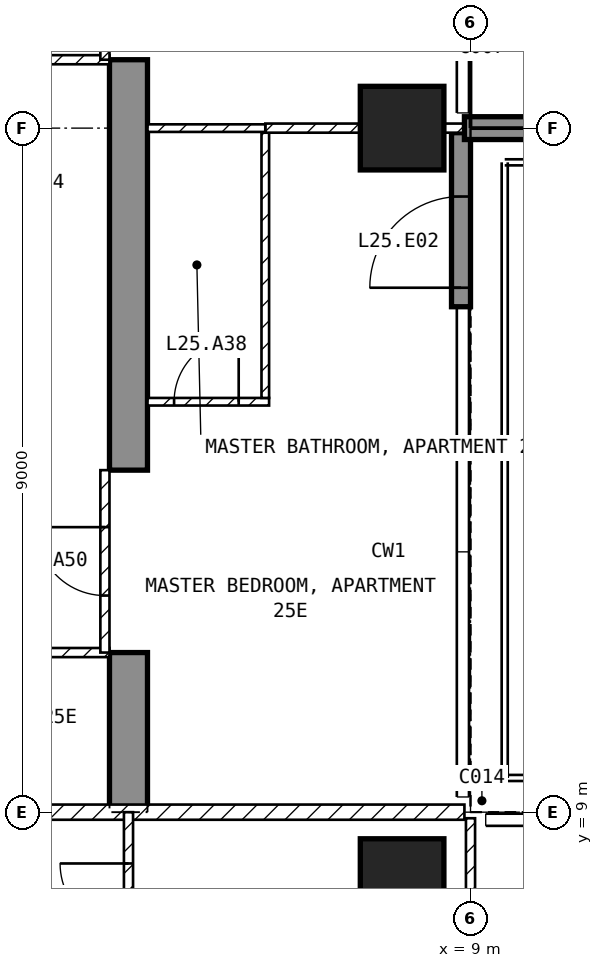
"""IFC4 building model, lengths in metres.
Left out: names, types, materials, properties, quantities, classifications, styles, units other than length and angle.
Written with IfcOpenShell. Run it as: python <this file> out.ifc"""

import sys

from ifc_helpers import new_model, si_unit, direction, frame, frame_2d, origin, origin_2d, place, context, subcontext, project, spatial, polyline, rectangle, outline, extrude, element, fill, save


model = new_model("IFC4")
c1 = context("Model", 3, precision=1e-05, world=origin(), true_north=direction((0.0, 1.0)))
c2 = subcontext(c1, "Body", "Model", "MODEL_VIEW")
j1 = project(units=[si_unit("LENGTHUNIT", "METRE"), si_unit("PLANEANGLEUNIT", "RADIAN")], contexts=[c1])
p1 = place(None, origin())
s1 = spatial("IfcSite", under=j1, at=p1, CompositionType="ELEMENT")
p2 = place(p1, origin())
s2 = spatial("IfcBuilding", under=s1, at=p2, CompositionType="ELEMENT")
p3 = place(p2, frame((0.0, 0.0, 109.4)))
s3 = spatial("IfcBuildingStorey", under=s2, at=p3, CompositionType="ELEMENT", Elevation=109.4)
for number, where, z_axis, x_axis in (
    (1, (8.1, 8.1, -0.25), (0.0, 0.0, 1.0), (1.0, 0.0, 0.0)),
    (2, (8.1, 18.0, -0.25), (0.0, 0.0, 1.0), (1.0, 0.0, 0.0)),
):
    element("IfcColumn", number, at=place(p3, frame(where, z_axis=z_axis, x_axis=x_axis)), inside=s3, PredefinedType="COLUMN", context=c2, shape_type="SweptSolid", body=[
        extrude(rectangle(XDim=1.1, YDim=1.1, at=origin_2d()), origin(), (0.0, 0.0, 1.0), 3.5),
    ])
p4 = place(p3, frame((4.25, 9.0, -0.25), z_axis=(1.0, 0.0, 0.0), x_axis=(0.0, 1.0, 0.0)))
e3 = element("IfcWall", 3, at=p4, inside=s3, PredefinedType="SHEAR", context=c2, shape_type="SweptSolid", body=[
    extrude(outline(polyline([(0.0, 0.0), (2.1, 0.0), (2.1, 2.65), (4.5, 2.65), (4.5, 0.0), (9.9, 0.0), (9.9, 2.65), (12.3, 2.65), (12.3, 0.0), (16.55, 0.0), (16.55, 3.5), (0.0, 3.5), (0.0, 0.0)])), origin(), (0.0, 0.0, 1.0), 0.5),
])
p5 = place(p3, frame((8.875, 15.65, 0.0), z_axis=(0.0, 0.0, 1.0), x_axis=(0.0, 1.0, 0.0)))
e4 = element("IfcWall", 4, at=p5, inside=s3, PredefinedType="SOLIDWALL", context=c2, shape_type="SweptSolid", body=[
    extrude(rectangle(XDim=2.29, YDim=0.25, at=frame_2d((1.145, 0.0))), origin(), (0.0, 0.0, 1.0), 3.25),
])
p6 = place(p5, frame((0.25, 0.0, 0.0)))
e5 = element("IfcOpeningElement", 5, at=p6, cuts=e4, PredefinedType="OPENING", context=c2, shape_type="SweptSolid", body=[
    extrude(rectangle(XDim=1.2, YDim=2.4, at=frame_2d((0.6, 1.2))), frame((0.0, 0.135, 0.0), z_axis=(0.0, -1.0, 0.0), x_axis=(1.0, 0.0, 0.0)), (0.0, 0.0, 1.0), 0.27),
])
p7 = place(p3, frame((8.92, 18.0, 0.0), z_axis=(0.0, 0.0, 1.0), x_axis=(1.0, 0.0, 0.0)))
e6 = element("IfcWall", 6, at=p7, inside=s3, PredefinedType="SOLIDWALL", context=c2, shape_type="SweptSolid", body=[
    extrude(rectangle(XDim=2.82, YDim=0.3, at=frame_2d((1.41, 0.0))), origin(), (0.0, 0.0, 1.0), 3.25),
])
p8 = place(p3, frame((-8.92, 9.0, 0.0), z_axis=(0.0, 0.0, 1.0), x_axis=(1.0, 0.0, 0.0)))
e7 = element("IfcWall", 7, at=p8, inside=s3, PredefinedType="PARTITIONING", context=c2, shape_type="SweptSolid", body=[
    extrude(rectangle(XDim=17.84, YDim=0.2, at=frame_2d((8.92, 0.0))), origin(), (0.0, 0.0, 1.0), 3.25),
])
p9 = place(p8, frame((8.42, 0.0, 0.0)))
e8 = element("IfcOpeningElement", 8, at=p9, cuts=e7, PredefinedType="OPENING", context=c2, shape_type="SweptSolid", body=[
    extrude(rectangle(XDim=1.0, YDim=2.1, at=frame_2d((0.5, 1.05))), frame((0.0, 0.11, 0.0), z_axis=(0.0, -1.0, 0.0), x_axis=(1.0, 0.0, 0.0)), (0.0, 0.0, 1.0), 0.22),
])
p10 = place(p3, frame((9.0, 1.3, 0.0), z_axis=(0.0, 0.0, 1.0), x_axis=(0.0, 1.0, 0.0)))
e9 = element("IfcWall", 9, at=p10, inside=s3, PredefinedType="PARTITIONING", context=c2, shape_type="SweptSolid", body=[
    extrude(rectangle(XDim=7.62, YDim=0.12, at=frame_2d((3.81, 0.0))), origin(), (0.0, 0.0, 1.0), 3.25),
])
p11 = place(p10, frame((0.85, 0.0, 0.0)))
e10 = element("IfcOpeningElement", 10, at=p11, cuts=e9, PredefinedType="OPENING", context=c2, shape_type="SweptSolid", body=[
    extrude(rectangle(XDim=0.9, YDim=2.1, at=frame_2d((0.45, 1.05))), frame((0.0, 0.07, 0.0), z_axis=(0.0, -1.0, 0.0), x_axis=(1.0, 0.0, 0.0)), (0.0, 0.0, 1.0), 0.14),
])
p12 = place(p3, frame((4.5, 6.75, 0.0), z_axis=(0.0, 0.0, 1.0), x_axis=(0.0, 1.0, 0.0)))
e11 = element("IfcWall", 11, at=p12, inside=s3, PredefinedType="PARTITIONING", context=c2, shape_type="SweptSolid", body=[
    extrude(rectangle(XDim=2.25, YDim=0.12, at=frame_2d((1.125, 0.0))), origin(), (0.0, 0.0, 1.0), 3.25),
])
p13 = place(p12, frame((0.675, 0.0, 0.0)))
e12 = element("IfcOpeningElement", 12, at=p13, cuts=e11, PredefinedType="OPENING", context=c2, shape_type="SweptSolid", body=[
    extrude(rectangle(XDim=0.9, YDim=2.1, at=frame_2d((0.45, 1.05))), frame((0.0, 0.07, 0.0), z_axis=(0.0, -1.0, 0.0), x_axis=(1.0, 0.0, 0.0)), (0.0, 0.0, 1.0), 0.14),
])
p14 = place(p3, frame((-2.1, 11.1, 0.0), z_axis=(0.0, 0.0, 1.0), x_axis=(1.0, 0.0, 0.0)))
e13 = element("IfcWall", 13, at=p14, inside=s3, PredefinedType="PARTITIONING", context=c2, shape_type="SweptSolid", body=[
    extrude(rectangle(XDim=6.35, YDim=0.12, at=frame_2d((3.175, 0.0))), origin(), (0.0, 0.0, 1.0), 3.25),
])
p15 = place(p14, frame((2.725, 0.0, 0.0)))
e14 = element("IfcOpeningElement", 14, at=p15, cuts=e13, PredefinedType="OPENING", context=c2, shape_type="SweptSolid", body=[
    extrude(rectangle(XDim=0.9, YDim=2.1, at=frame_2d((0.45, 1.05))), frame((0.0, 0.07, 0.0), z_axis=(0.0, -1.0, 0.0), x_axis=(1.0, 0.0, 0.0)), (0.0, 0.0, 1.0), 0.14),
])
p16 = place(p3, frame((-4.25, 18.9, 0.0), z_axis=(0.0, 0.0, 1.0), x_axis=(1.0, 0.0, 0.0)))
e15 = element("IfcWall", 15, at=p16, inside=s3, PredefinedType="PARTITIONING", context=c2, shape_type="SweptSolid", body=[
    extrude(rectangle(XDim=8.5, YDim=0.12, at=frame_2d((4.25, 0.0))), origin(), (0.0, 0.0, 1.0), 3.25),
])
p17 = place(p16, frame((5.675, 0.0, 0.0)))
e16 = element("IfcOpeningElement", 16, at=p17, cuts=e15, PredefinedType="OPENING", context=c2, shape_type="SweptSolid", body=[
    extrude(rectangle(XDim=0.9, YDim=2.1, at=frame_2d((0.45, 1.05))), frame((0.0, 0.07, 0.0), z_axis=(0.0, -1.0, 0.0), x_axis=(1.0, 0.0, 0.0)), (0.0, 0.0, 1.0), 0.14),
])
p18 = place(p3, frame((4.75, 14.4, 0.0), z_axis=(0.0, 0.0, 1.0), x_axis=(1.0, 0.0, 0.0)))
e17 = element("IfcWall", 17, at=p18, inside=s3, PredefinedType="PARTITIONING", context=c2, shape_type="SweptSolid", body=[
    extrude(rectangle(XDim=1.6, YDim=0.1, at=frame_2d((0.8, 0.0))), origin(), (0.0, 0.0, 1.0), 3.25),
])
p19 = place(p18, frame((0.35, 0.0, 0.0)))
e18 = element("IfcOpeningElement", 18, at=p19, cuts=e17, PredefinedType="OPENING", context=c2, shape_type="SweptSolid", body=[
    extrude(rectangle(XDim=0.85, YDim=2.1, at=frame_2d((0.425, 1.05))), frame((0.0, 0.06, 0.0), z_axis=(0.0, -1.0, 0.0), x_axis=(1.0, 0.0, 0.0)), (0.0, 0.0, 1.0), 0.12),
])
p20 = place(p3, frame((6.3, 14.45, 0.0), z_axis=(0.0, 0.0, 1.0), x_axis=(0.0, 1.0, 0.0)))
e19 = element("IfcWall", 19, at=p20, inside=s3, PredefinedType="PARTITIONING", context=c2, shape_type="SweptSolid", body=[
    extrude(rectangle(XDim=3.49, YDim=0.1, at=frame_2d((1.745, 0.0))), origin(), (0.0, 0.0, 1.0), 3.25),
])
p21 = place(p3, frame((6.3, 18.0, 0.0), z_axis=(0.0, 0.0, 1.0), x_axis=(1.0, 0.0, 0.0)))
e20 = element("IfcWall", 20, at=p21, inside=s3, PredefinedType="PARTITIONING", context=c2, shape_type="SweptSolid", body=[
    extrude(rectangle(XDim=2.62, YDim=0.12, at=frame_2d((1.31, 0.0))), origin(), (0.0, 0.0, 1.0), 2.414),
])
p22 = place(p3, frame((4.75, 18.0, 0.0), z_axis=(0.0, 0.0, 1.0), x_axis=(1.0, 0.0, 0.0)))
e21 = element("IfcWall", 21, at=p22, inside=s3, PredefinedType="PARTITIONING", context=c2, shape_type="SweptSolid", body=[
    extrude(rectangle(XDim=1.55, YDim=0.1, at=frame_2d((0.775, 0.0))), origin(), (0.0, 0.0, 1.0), 2.414),
])
p23 = place(p3, frame((4.19, 11.1, 0.0), z_axis=(0.0, 0.0, 1.0), x_axis=(0.0, 1.0, 0.0)))
e22 = element("IfcWall", 22, at=p23, inside=s3, PredefinedType="PARTITIONING", context=c2, shape_type="SweptSolid", body=[
    extrude(rectangle(XDim=2.4, YDim=0.12, at=frame_2d((1.2, 0.0))), origin(), (0.0, 0.0, 1.0), 2.4),
])
p24 = place(p23, frame((0.75, 0.0, 0.0)))
e23 = element("IfcOpeningElement", 23, at=p24, cuts=e22, PredefinedType="OPENING", context=c2, shape_type="SweptSolid", body=[
    extrude(rectangle(XDim=0.9, YDim=2.1, at=frame_2d((0.45, 1.05))), frame((0.0, 0.07, 0.0), z_axis=(0.0, -1.0, 0.0), x_axis=(1.0, 0.0, 0.0)), (0.0, 0.0, 1.0), 0.14),
])
p25 = place(p3, frame((4.19, 18.9, 0.0), z_axis=(0.0, 0.0, 1.0), x_axis=(0.0, 1.0, 0.0)))
e24 = element("IfcWall", 24, at=p25, inside=s3, PredefinedType="PARTITIONING", context=c2, shape_type="SweptSolid", body=[
    extrude(rectangle(XDim=2.4, YDim=0.12, at=frame_2d((1.2, 0.0))), origin(), (0.0, 0.0, 1.0), 2.4),
])
p26 = place(p25, frame((0.75, 0.0, 0.0)))
e25 = element("IfcOpeningElement", 25, at=p26, cuts=e24, PredefinedType="OPENING", context=c2, shape_type="SweptSolid", body=[
    extrude(rectangle(XDim=0.9, YDim=2.1, at=frame_2d((0.45, 1.05))), frame((0.0, 0.07, 0.0), z_axis=(0.0, -1.0, 0.0), x_axis=(1.0, 0.0, 0.0)), (0.0, 0.0, 1.0), 0.14),
])
p27 = place(p6, origin())
e26 = element("IfcDoor", 26, at=p27, inside=s3, OperationType="SINGLE_SWING_LEFT", PredefinedType="DOOR", context=c2, shape_type="SweptSolid", body=[
    extrude(rectangle(XDim=1.2, YDim=2.4, at=frame_2d((0.6, 1.2))), frame((0.0, 0.025, 0.0), z_axis=(0.0, -1.0, 0.0), x_axis=(1.0, 0.0, 0.0)), (0.0, 0.0, 1.0), 0.05),
])
fill(e5, e26)
p28 = place(p13, origin())
e27 = element("IfcDoor", 27, at=p28, inside=s3, OperationType="SINGLE_SWING_RIGHT", PredefinedType="DOOR", context=c2, shape_type="SweptSolid", body=[
    extrude(rectangle(XDim=0.9, YDim=2.1, at=frame_2d((0.45, 1.05))), frame((0.0, 0.025, 0.0), z_axis=(0.0, -1.0, 0.0), x_axis=(1.0, 0.0, 0.0)), (0.0, 0.0, 1.0), 0.05),
])
fill(e12, e27)
p29 = place(p19, origin())
e28 = element("IfcDoor", 28, at=p29, inside=s3, OperationType="SINGLE_SWING_RIGHT", PredefinedType="DOOR", context=c2, shape_type="SweptSolid", body=[
    extrude(rectangle(XDim=0.85, YDim=2.1, at=frame_2d((0.425, 1.05))), frame((0.0, 0.025, 0.0), z_axis=(0.0, -1.0, 0.0), x_axis=(1.0, 0.0, 0.0)), (0.0, 0.0, 1.0), 0.05),
])
fill(e18, e28)
p30 = place(p24, origin())
e29 = element("IfcDoor", 29, at=p30, inside=s3, OperationType="SINGLE_SWING_RIGHT", PredefinedType="DOOR", context=c2, shape_type="SweptSolid", body=[
    extrude(rectangle(XDim=0.9, YDim=2.1, at=frame_2d((0.45, 1.05))), frame((0.0, 0.025, 0.0), z_axis=(0.0, -1.0, 0.0), x_axis=(1.0, 0.0, 0.0)), (0.0, 0.0, 1.0), 0.05),
])
fill(e23, e29)
save(model, sys.argv[1])
